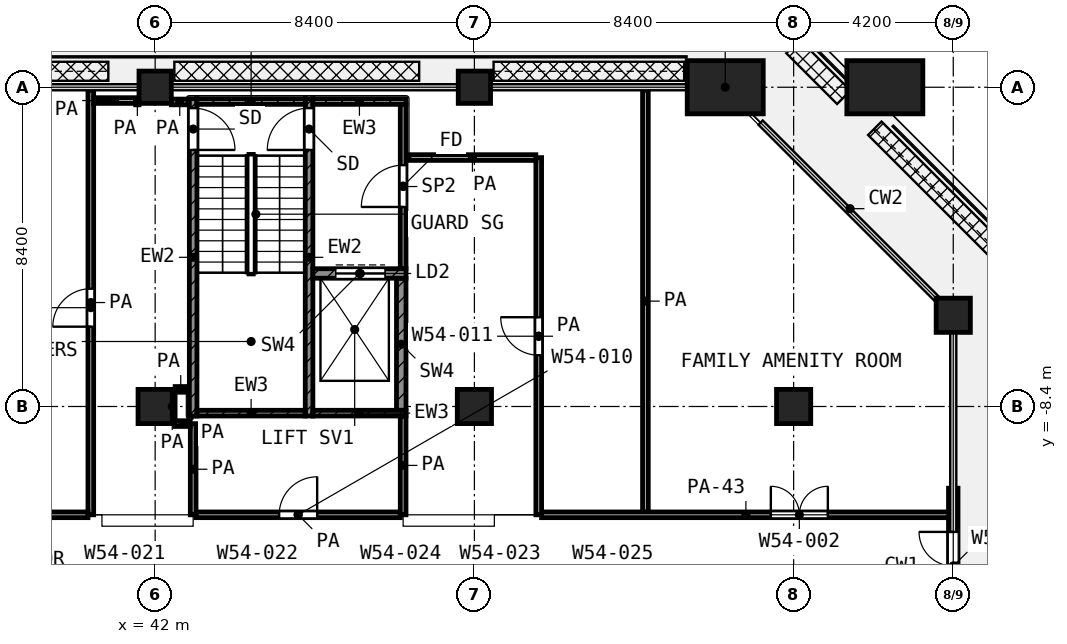
"""IFC4 building model, lengths in metres.
Left out: names, types, materials, properties, quantities, classifications, styles, units other than length and angle.
Written with IfcOpenShell. Run it as: python <this file> out.ifc"""

import sys

from ifc_helpers import new_model, si_unit, direction, frame, frame_2d, origin, origin_2d, place, context, subcontext, project, spatial, rectangle, extrude, element, fill, save


model = new_model("IFC4")
c1 = context("Model", 3, precision=1e-05, world=origin(), true_north=direction((0.0, 1.0)))
c2 = subcontext(c1, "Body", "Model", "MODEL_VIEW")
j1 = project(units=[si_unit("LENGTHUNIT", "METRE"), si_unit("PLANEANGLEUNIT", "RADIAN")], contexts=[c1])
p1 = place(None, origin())
s1 = spatial("IfcSite", under=j1, at=p1, CompositionType="ELEMENT")
p2 = place(p1, origin())
s2 = spatial("IfcBuilding", under=s1, at=p2, CompositionType="ELEMENT")
p3 = place(p2, frame((0.0, 0.0, 234.8)))
s3 = spatial("IfcBuildingStorey", under=s2, at=p3, CompositionType="ELEMENT", Elevation=234.8)
for number, where, z_axis, x_axis in (
    (1, (42.0, 0.0, 0.0), (0.0, 0.0, 1.0), (1.0, 0.0, 0.0)),
    (2, (50.4, 0.0, 0.0), (0.0, 0.0, 1.0), (1.0, 0.0, 0.0)),
):
    element("IfcColumn", number, at=place(p3, frame(where, z_axis=z_axis, x_axis=x_axis)), inside=s3, PredefinedType="COLUMN", context=c2, shape_type="SweptSolid", body=[
        extrude(rectangle(XDim=0.85, YDim=0.85, at=origin_2d()), origin(), (0.0, 0.0, 1.0), 4.2),
    ])
p4 = place(p3, frame((57.0, 0.0, 0.0), z_axis=(0.0, 0.0, 1.0), x_axis=(1.0, 0.0, 0.0)))
e3 = element("IfcColumn", 3, at=p4, inside=s3, PredefinedType="COLUMN", context=c2, shape_type="SweptSolid", body=[
    extrude(rectangle(XDim=2.0, YDim=1.4, at=origin_2d()), origin(), (0.0, 0.0, 1.0), 4.2),
])
for number, where, z_axis, x_axis in (
    (4, (63.0, -6.0, 0.0), (0.0, 0.0, 1.0), (1.0, 0.0, 0.0)),
    (5, (42.0, -8.4, 0.0), (0.0, 0.0, 1.0), (1.0, 0.0, 0.0)),
    (6, (50.4, -8.4, 0.0), (0.0, 0.0, 1.0), (1.0, 0.0, 0.0)),
    (7, (58.8, -8.4, 0.0), (0.0, 0.0, 1.0), (1.0, 0.0, 0.0)),
):
    element("IfcColumn", number, at=place(p3, frame(where, z_axis=z_axis, x_axis=x_axis)), inside=s3, PredefinedType="COLUMN", context=c2, shape_type="SweptSolid", body=[
        extrude(rectangle(XDim=0.9, YDim=0.9, at=origin_2d()), origin(), (0.0, 0.0, 1.0), 4.2),
    ])
p5 = place(p3, frame((61.2, 0.0, 0.0), z_axis=(0.0, 0.0, 1.0), x_axis=(1.0, 0.0, 0.0)))
e8 = element("IfcColumn", 8, at=p5, inside=s3, PredefinedType="COLUMN", context=c2, shape_type="SweptSolid", body=[
    extrude(rectangle(XDim=2.0, YDim=1.4, at=origin_2d()), origin(), (0.0, 0.0, 1.0), 4.2),
])
p6 = place(p3, frame((63.0, -14.65, 0.0), z_axis=(0.0, 0.0, 1.0), x_axis=(0.0, 1.0, 0.0)))
e9 = element("IfcWall", 9, at=p6, inside=s3, PredefinedType="SOLIDWALL", context=c2, shape_type="SweptSolid", body=[
    extrude(rectangle(XDim=4.1, YDim=0.25, at=frame_2d((2.05, 0.0))), origin(), (0.0, 0.0, 1.0), 2.58),
])
p7 = place(p6, frame((1.15, 0.0, 0.0)))
e10 = element("IfcOpeningElement", 10, at=p7, cuts=e9, PredefinedType="OPENING", context=c2, shape_type="SweptSolid", body=[
    extrude(rectangle(XDim=1.8, YDim=2.1, at=frame_2d((0.9, 1.05))), frame((0.0, 0.135, 0.0), z_axis=(0.0, -1.0, 0.0), x_axis=(1.0, 0.0, 0.0)), (0.0, 0.0, 1.0), 0.27),
])
p8 = place(p3, frame((43.0, -8.65, 0.0), z_axis=(0.0, 0.0, 1.0), x_axis=(0.0, 1.0, 0.0)))
e11 = element("IfcWall", 11, at=p8, inside=s3, PredefinedType="SHEAR", context=c2, shape_type="SweptSolid", body=[
    extrude(rectangle(XDim=8.35, YDim=0.2, at=frame_2d((4.175, 0.0))), origin(), (0.0, 0.0, 1.0), 3.6),
])
p9 = place(p8, frame((7.0, 0.0, 0.0)))
e12 = element("IfcOpeningElement", 12, at=p9, cuts=e11, PredefinedType="OPENING", context=c2, shape_type="SweptSolid", body=[
    extrude(rectangle(XDim=1.1, YDim=2.1, at=frame_2d((0.55, 1.05))), frame((0.0, 0.11, 0.0), z_axis=(0.0, -1.0, 0.0), x_axis=(1.0, 0.0, 0.0)), (0.0, 0.0, 1.0), 0.22),
])
p10 = place(p3, frame((46.05, -8.65, 0.0), z_axis=(0.0, 0.0, 1.0), x_axis=(0.0, 1.0, 0.0)))
e13 = element("IfcWall", 13, at=p10, inside=s3, PredefinedType="SHEAR", context=c2, shape_type="SweptSolid", body=[
    extrude(rectangle(XDim=8.35, YDim=0.2, at=frame_2d((4.175, 0.0))), origin(), (0.0, 0.0, 1.0), 3.6),
])
p11 = place(p10, frame((7.0, 0.0, 0.0)))
e14 = element("IfcOpeningElement", 14, at=p11, cuts=e13, PredefinedType="OPENING", context=c2, shape_type="SweptSolid", body=[
    extrude(rectangle(XDim=1.1, YDim=2.1, at=frame_2d((0.55, 1.05))), frame((0.0, 0.11, 0.0), z_axis=(0.0, -1.0, 0.0), x_axis=(1.0, 0.0, 0.0)), (0.0, 0.0, 1.0), 0.22),
])
p12 = place(p3, frame((43.1, -0.375, 0.0), z_axis=(0.0, 0.0, 1.0), x_axis=(1.0, 0.0, 0.0)))
e15 = element("IfcWall", 15, at=p12, inside=s3, PredefinedType="SHEAR", context=c2, shape_type="SweptSolid", body=[
    extrude(rectangle(XDim=2.85, YDim=0.15, at=frame_2d((1.425, 0.0))), origin(), (0.0, 0.0, 1.0), 3.6),
])
p13 = place(p3, frame((46.15, -0.375, 0.0), z_axis=(0.0, 0.0, 1.0), x_axis=(1.0, 0.0, 0.0)))
e16 = element("IfcWall", 16, at=p13, inside=s3, PredefinedType="SHEAR", context=c2, shape_type="SweptSolid", body=[
    extrude(rectangle(XDim=2.45, YDim=0.15, at=frame_2d((1.225, 0.0))), origin(), (0.0, 0.0, 1.0), 3.6),
])
p14 = place(p3, frame((43.1, -8.575, 0.0), z_axis=(0.0, 0.0, 1.0), x_axis=(1.0, 0.0, 0.0)))
e17 = element("IfcWall", 17, at=p14, inside=s3, PredefinedType="SHEAR", context=c2, shape_type="SweptSolid", body=[
    extrude(rectangle(XDim=2.85, YDim=0.15, at=frame_2d((1.425, 0.0))), origin(), (0.0, 0.0, 1.0), 3.6),
])
p15 = place(p3, frame((46.15, -8.575, 0.0), z_axis=(0.0, 0.0, 1.0), x_axis=(1.0, 0.0, 0.0)))
e18 = element("IfcWall", 18, at=p15, inside=s3, PredefinedType="SHEAR", context=c2, shape_type="SweptSolid", body=[
    extrude(rectangle(XDim=2.45, YDim=0.15, at=frame_2d((1.225, 0.0))), origin(), (0.0, 0.0, 1.0), 3.6),
])
p16 = place(p3, frame((46.15, -4.9, 0.0), z_axis=(0.0, 0.0, 1.0), x_axis=(1.0, 0.0, 0.0)))
e19 = element("IfcWall", 19, at=p16, inside=s3, PredefinedType="SHEAR", context=c2, shape_type="SweptSolid", body=[
    extrude(rectangle(XDim=2.45, YDim=0.25, at=frame_2d((1.225, 0.0))), origin(), (0.0, 0.0, 1.0), 3.6),
])
p17 = place(p16, frame((0.6, 0.0, 0.0)))
e20 = element("IfcOpeningElement", 20, at=p17, cuts=e19, PredefinedType="OPENING", context=c2, shape_type="SweptSolid", body=[
    extrude(rectangle(XDim=1.3, YDim=2.1, at=frame_2d((0.65, 1.05))), frame((0.0, 0.135, 0.0), z_axis=(0.0, -1.0, 0.0), x_axis=(1.0, 0.0, 0.0)), (0.0, 0.0, 1.0), 0.27),
])
p18 = place(p3, frame((48.475, -8.5, 0.0), z_axis=(0.0, 0.0, 1.0), x_axis=(0.0, 1.0, 0.0)))
e21 = element("IfcWall", 21, at=p18, inside=s3, PredefinedType="SHEAR", context=c2, shape_type="SweptSolid", body=[
    extrude(rectangle(XDim=3.475, YDim=0.25, at=frame_2d((1.738, 0.0))), origin(), (0.0, 0.0, 1.0), 3.6),
])
p19 = place(p3, frame((48.525, -4.775, 0.0), z_axis=(0.0, 0.0, 1.0), x_axis=(0.0, 1.0, 0.0)))
e22 = element("IfcWall", 22, at=p19, inside=s3, PredefinedType="PARTITIONING", context=c2, shape_type="SweptSolid", body=[
    extrude(rectangle(XDim=4.325, YDim=0.15, at=frame_2d((2.163, 0.0))), origin(), (0.0, 0.0, 1.0), 3.6),
])
p20 = place(p19, frame((1.625, 0.0, 0.0)))
e23 = element("IfcOpeningElement", 23, at=p20, cuts=e22, PredefinedType="OPENING", context=c2, shape_type="SweptSolid", body=[
    extrude(rectangle(XDim=1.1, YDim=2.1, at=frame_2d((0.55, 1.05))), frame((0.0, 0.085, 0.0), z_axis=(0.0, -1.0, 0.0), x_axis=(1.0, 0.0, 0.0)), (0.0, 0.0, 1.0), 0.17),
])
p21 = place(p3, frame((29.4, -11.25, 0.0), z_axis=(0.0, 0.0, 1.0), x_axis=(1.0, 0.0, 0.0)))
e24 = element("IfcWall", 24, at=p21, inside=s3, PredefinedType="PARTITIONING", context=c2, shape_type="SweptSolid", body=[
    extrude(rectangle(XDim=10.832, YDim=0.15, at=frame_2d((5.416, 0.0))), origin(), (0.0, 0.0, 1.0), 3.6),
])
p22 = place(p21, frame((1.5, 0.0, 0.0)))
e25 = element("IfcOpeningElement", 25, at=p22, cuts=e24, PredefinedType="OPENING", context=c2, shape_type="SweptSolid", body=[
    extrude(rectangle(XDim=1.2, YDim=2.1, at=frame_2d((0.6, 1.05))), frame((0.0, 0.085, 0.0), z_axis=(0.0, -1.0, 0.0), x_axis=(1.0, 0.0, 0.0)), (0.0, 0.0, 1.0), 0.17),
])
p23 = place(p3, frame((43.075, -11.25, 0.0), z_axis=(0.0, 0.0, 1.0), x_axis=(1.0, 0.0, 0.0)))
e26 = element("IfcWall", 26, at=p23, inside=s3, PredefinedType="PARTITIONING", context=c2, shape_type="SweptSolid", body=[
    extrude(rectangle(XDim=5.375, YDim=0.15, at=frame_2d((2.688, 0.0))), origin(), (0.0, 0.0, 1.0), 3.6),
])
p24 = place(p23, frame((2.188, 0.0, 0.0)))
e27 = element("IfcOpeningElement", 27, at=p24, cuts=e26, PredefinedType="OPENING", context=c2, shape_type="SweptSolid", body=[
    extrude(rectangle(XDim=1.0, YDim=2.1, at=frame_2d((0.5, 1.05))), frame((0.0, 0.085, 0.0), z_axis=(0.0, -1.0, 0.0), x_axis=(1.0, 0.0, 0.0)), (0.0, 0.0, 1.0), 0.17),
])
p25 = place(p3, frame((52.168, -11.25, 0.0), z_axis=(0.0, 0.0, 1.0), x_axis=(1.0, 0.0, 0.0)))
e28 = element("IfcWall", 28, at=p25, inside=s3, PredefinedType="PARTITIONING", context=c2, shape_type="SweptSolid", body=[
    extrude(rectangle(XDim=10.752, YDim=0.15, at=frame_2d((5.376, 0.0))), origin(), (0.0, 0.0, 1.0), 2.7),
])
p26 = place(p25, frame((6.032, 0.0, 0.0)))
e29 = element("IfcOpeningElement", 29, at=p26, cuts=e28, PredefinedType="OPENING", context=c2, shape_type="SweptSolid", body=[
    extrude(rectangle(XDim=1.5, YDim=2.1, at=frame_2d((0.75, 1.05))), frame((0.0, 0.085, 0.0), z_axis=(0.0, -1.0, 0.0), x_axis=(1.0, 0.0, 0.0)), (0.0, 0.0, 1.0), 0.17),
])
p27 = place(p3, frame((42.525, -8.85, 0.0), z_axis=(0.0, 0.0, 1.0), x_axis=(1.0, 0.0, 0.0)))
e30 = element("IfcWall", 30, at=p27, inside=s3, PredefinedType="PARTITIONING", context=c2, shape_type="SweptSolid", body=[
    extrude(rectangle(XDim=0.398, YDim=0.15, at=frame_2d((0.199, 0.0))), origin(), (0.0, 0.0, 1.0), 3.6),
])
p28 = place(p3, frame((42.526, -7.95, 0.0), z_axis=(0.0, 0.0, 1.0), x_axis=(1.0, 0.0, 0.0)))
e31 = element("IfcWall", 31, at=p28, inside=s3, PredefinedType="PARTITIONING", context=c2, shape_type="SweptSolid", body=[
    extrude(rectangle(XDim=0.294, YDim=0.15, at=frame_2d((0.147, 0.0))), origin(), (0.0, 0.0, 1.0), 3.6),
])
p29 = place(p3, frame((48.68, -1.85, 0.0), z_axis=(0.0, 0.0, 1.0), x_axis=(1.0, 0.0, 0.0)))
e32 = element("IfcWall", 32, at=p29, inside=s3, PredefinedType="PARTITIONING", context=c2, shape_type="SweptSolid", body=[
    extrude(rectangle(XDim=3.337, YDim=0.15, at=frame_2d((1.668, 0.0))), origin(), (0.0, 0.0, 1.0), 3.6),
])
p30 = place(p3, frame((41.488, -0.387, 0.0), z_axis=(0.0, 0.0, 1.0), x_axis=(1.0, 0.0, 0.0)))
e33 = element("IfcWall", 33, at=p30, inside=s3, PredefinedType="PARTITIONING", context=c2, shape_type="SweptSolid", body=[
    extrude(rectangle(XDim=0.087, YDim=0.15, at=frame_2d((0.043, 0.0))), origin(), (0.0, 0.0, 1.0), 3.6),
])
p31 = place(p3, frame((42.425, -0.387, 0.0), z_axis=(0.0, 0.0, 1.0), x_axis=(1.0, 0.0, 0.0)))
e34 = element("IfcWall", 34, at=p31, inside=s3, PredefinedType="PARTITIONING", context=c2, shape_type="SweptSolid", body=[
    extrude(rectangle(XDim=0.445, YDim=0.15, at=frame_2d((0.223, 0.0))), origin(), (0.0, 0.0, 1.0), 3.6),
])
p32 = place(p3, frame((40.382, -0.35, 0.0), z_axis=(0.0, 0.0, 1.0), x_axis=(1.0, 0.0, 0.0)))
e35 = element("IfcWall", 35, at=p32, inside=s3, PredefinedType="PARTITIONING", context=c2, shape_type="SweptSolid", body=[
    extrude(rectangle(XDim=1.106, YDim=0.15, at=frame_2d((0.553, 0.0))), origin(), (0.0, 0.0, 1.0), 3.6),
])
p33 = place(p3, frame((40.307, -11.25, 0.0), z_axis=(0.0, 0.0, 1.0), x_axis=(0.0, 1.0, 0.0)))
e36 = element("IfcWall", 36, at=p33, inside=s3, PredefinedType="PARTITIONING", context=c2, shape_type="SweptSolid", body=[
    extrude(rectangle(XDim=11.17, YDim=0.15, at=frame_2d((5.585, 0.0))), origin(), (0.0, 0.0, 1.0), 3.6),
])
p34 = place(p33, frame((4.95, 0.0, 0.0)))
e37 = element("IfcOpeningElement", 37, at=p34, cuts=e36, PredefinedType="OPENING", context=c2, shape_type="SweptSolid", body=[
    extrude(rectangle(XDim=1.0, YDim=2.1, at=frame_2d((0.5, 1.05))), frame((0.0, 0.085, 0.0), z_axis=(0.0, -1.0, 0.0), x_axis=(1.0, 0.0, 0.0)), (0.0, 0.0, 1.0), 0.17),
])
p35 = place(p3, frame((42.45, -8.85, 0.0), z_axis=(0.0, 0.0, 1.0), x_axis=(0.0, 1.0, 0.0)))
e38 = element("IfcWall", 38, at=p35, inside=s3, PredefinedType="PARTITIONING", context=c2, shape_type="SweptSolid", body=[
    extrude(rectangle(XDim=0.899, YDim=0.15, at=frame_2d((0.45, 0.0))), origin(), (0.0, 0.0, 1.0), 3.6),
])
p36 = place(p3, frame((43.0, -11.25, 0.0), z_axis=(0.0, 0.0, 1.0), x_axis=(0.0, 1.0, 0.0)))
e39 = element("IfcWall", 39, at=p36, inside=s3, PredefinedType="PARTITIONING", context=c2, shape_type="SweptSolid", body=[
    extrude(rectangle(XDim=2.398, YDim=0.15, at=frame_2d((1.199, 0.0))), origin(), (0.0, 0.0, 1.0), 3.6),
])
p37 = place(p3, frame((48.525, -11.25, 0.0), z_axis=(0.0, 0.0, 1.0), x_axis=(0.0, 1.0, 0.0)))
e40 = element("IfcWall", 40, at=p37, inside=s3, PredefinedType="PARTITIONING", context=c2, shape_type="SweptSolid", body=[
    extrude(rectangle(XDim=2.6, YDim=0.15, at=frame_2d((1.3, 0.0))), origin(), (0.0, 0.0, 1.0), 3.6),
])
p38 = place(p3, frame((52.093, -11.25, 0.0), z_axis=(0.0, 0.0, 1.0), x_axis=(0.0, 1.0, 0.0)))
e41 = element("IfcWall", 41, at=p38, inside=s3, PredefinedType="PARTITIONING", context=c2, shape_type="SweptSolid", body=[
    extrude(rectangle(XDim=9.398, YDim=0.15, at=frame_2d((4.699, 0.0))), origin(), (0.0, 0.0, 1.0), 3.6),
])
p39 = place(p38, frame((4.199, 0.0, 0.0)))
e42 = element("IfcOpeningElement", 42, at=p39, cuts=e41, PredefinedType="OPENING", context=c2, shape_type="SweptSolid", body=[
    extrude(rectangle(XDim=1.0, YDim=2.1, at=frame_2d((0.5, 1.05))), frame((0.0, 0.085, 0.0), z_axis=(0.0, -1.0, 0.0), x_axis=(1.0, 0.0, 0.0)), (0.0, 0.0, 1.0), 0.17),
])
p40 = place(p3, frame((54.9, -11.175, 0.0), z_axis=(0.0, 0.0, 1.0), x_axis=(0.0, 1.0, 0.0)))
e43 = element("IfcWall", 43, at=p40, inside=s3, PredefinedType="PARTITIONING", context=c2, shape_type="SweptSolid", body=[
    extrude(rectangle(XDim=11.095, YDim=0.15, at=frame_2d((5.547, 0.0))), origin(), (0.0, 0.0, 1.0), 3.6),
])
p41 = place(p7, origin())
e44 = element("IfcDoor", 44, at=p41, inside=s3, OperationType="DOUBLE_DOOR_SINGLE_SWING", PredefinedType="DOOR", context=c2, shape_type="SweptSolid", body=[
    extrude(rectangle(XDim=1.8, YDim=2.1, at=frame_2d((0.9, 1.05))), frame((0.0, 0.025, 0.0), z_axis=(0.0, -1.0, 0.0), x_axis=(1.0, 0.0, 0.0)), (0.0, 0.0, 1.0), 0.05),
])
fill(e10, e44)
p42 = place(p9, frame((1.1, 0.0, 0.0), z_axis=(0.0, 0.0, 1.0), x_axis=(-1.0, 0.0, 0.0)))
e45 = element("IfcDoor", 45, at=p42, inside=s3, OperationType="SINGLE_SWING_LEFT", PredefinedType="DOOR", context=c2, shape_type="SweptSolid", body=[
    extrude(rectangle(XDim=1.1, YDim=2.1, at=frame_2d((0.55, 1.05))), frame((0.0, 0.025, 0.0), z_axis=(0.0, -1.0, 0.0), x_axis=(1.0, 0.0, 0.0)), (0.0, 0.0, 1.0), 0.05),
])
fill(e12, e45)
p43 = place(p11, origin())
e46 = element("IfcDoor", 46, at=p43, inside=s3, OperationType="SINGLE_SWING_LEFT", PredefinedType="DOOR", context=c2, shape_type="SweptSolid", body=[
    extrude(rectangle(XDim=1.1, YDim=2.1, at=frame_2d((0.55, 1.05))), frame((0.0, 0.025, 0.0), z_axis=(0.0, -1.0, 0.0), x_axis=(1.0, 0.0, 0.0)), (0.0, 0.0, 1.0), 0.05),
])
fill(e14, e46)
p44 = place(p17, origin())
e47 = element("IfcDoor", 47, at=p44, inside=s3, OperationType="DOUBLE_DOOR_SLIDING", PredefinedType="DOOR", context=c2, shape_type="SweptSolid", body=[
    extrude(rectangle(XDim=1.3, YDim=2.1, at=frame_2d((0.65, 1.05))), frame((0.0, 0.025, 0.0), z_axis=(0.0, -1.0, 0.0), x_axis=(1.0, 0.0, 0.0)), (0.0, 0.0, 1.0), 0.05),
])
fill(e20, e47)
p45 = place(p20, origin())
e48 = element("IfcDoor", 48, at=p45, inside=s3, OperationType="SINGLE_SWING_LEFT", PredefinedType="DOOR", context=c2, shape_type="SweptSolid", body=[
    extrude(rectangle(XDim=1.1, YDim=2.1, at=frame_2d((0.55, 1.05))), frame((0.0, 0.025, 0.0), z_axis=(0.0, -1.0, 0.0), x_axis=(1.0, 0.0, 0.0)), (0.0, 0.0, 1.0), 0.05),
])
fill(e23, e48)
p46 = place(p34, origin())
e49 = element("IfcDoor", 49, at=p46, inside=s3, OperationType="SINGLE_SWING_LEFT", PredefinedType="DOOR", context=c2, shape_type="SweptSolid", body=[
    extrude(rectangle(XDim=1.0, YDim=2.1, at=frame_2d((0.5, 1.05))), frame((0.0, 0.025, 0.0), z_axis=(0.0, -1.0, 0.0), x_axis=(1.0, 0.0, 0.0)), (0.0, 0.0, 1.0), 0.05),
])
fill(e37, e49)
p47 = place(p24, origin())
e50 = element("IfcDoor", 50, at=p47, inside=s3, OperationType="SINGLE_SWING_RIGHT", PredefinedType="DOOR", context=c2, shape_type="SweptSolid", body=[
    extrude(rectangle(XDim=1.0, YDim=2.1, at=frame_2d((0.5, 1.05))), frame((0.0, 0.025, 0.0), z_axis=(0.0, -1.0, 0.0), x_axis=(1.0, 0.0, 0.0)), (0.0, 0.0, 1.0), 0.05),
])
fill(e27, e50)
p48 = place(p39, origin())
e51 = element("IfcDoor", 51, at=p48, inside=s3, OperationType="SINGLE_SWING_RIGHT", PredefinedType="DOOR", context=c2, shape_type="SweptSolid", body=[
    extrude(rectangle(XDim=1.0, YDim=2.1, at=frame_2d((0.5, 1.05))), frame((0.0, 0.025, 0.0), z_axis=(0.0, -1.0, 0.0), x_axis=(1.0, 0.0, 0.0)), (0.0, 0.0, 1.0), 0.05),
])
fill(e42, e51)
p49 = place(p26, origin())
e52 = element("IfcDoor", 52, at=p49, inside=s3, OperationType="DOUBLE_DOOR_SINGLE_SWING", PredefinedType="DOOR", context=c2, shape_type="SweptSolid", body=[
    extrude(rectangle(XDim=1.5, YDim=2.1, at=frame_2d((0.75, 1.05))), frame((0.0, 0.025, 0.0), z_axis=(0.0, -1.0, 0.0), x_axis=(1.0, 0.0, 0.0)), (0.0, 0.0, 1.0), 0.05),
])
fill(e29, e52)
save(model, sys.argv[1])
